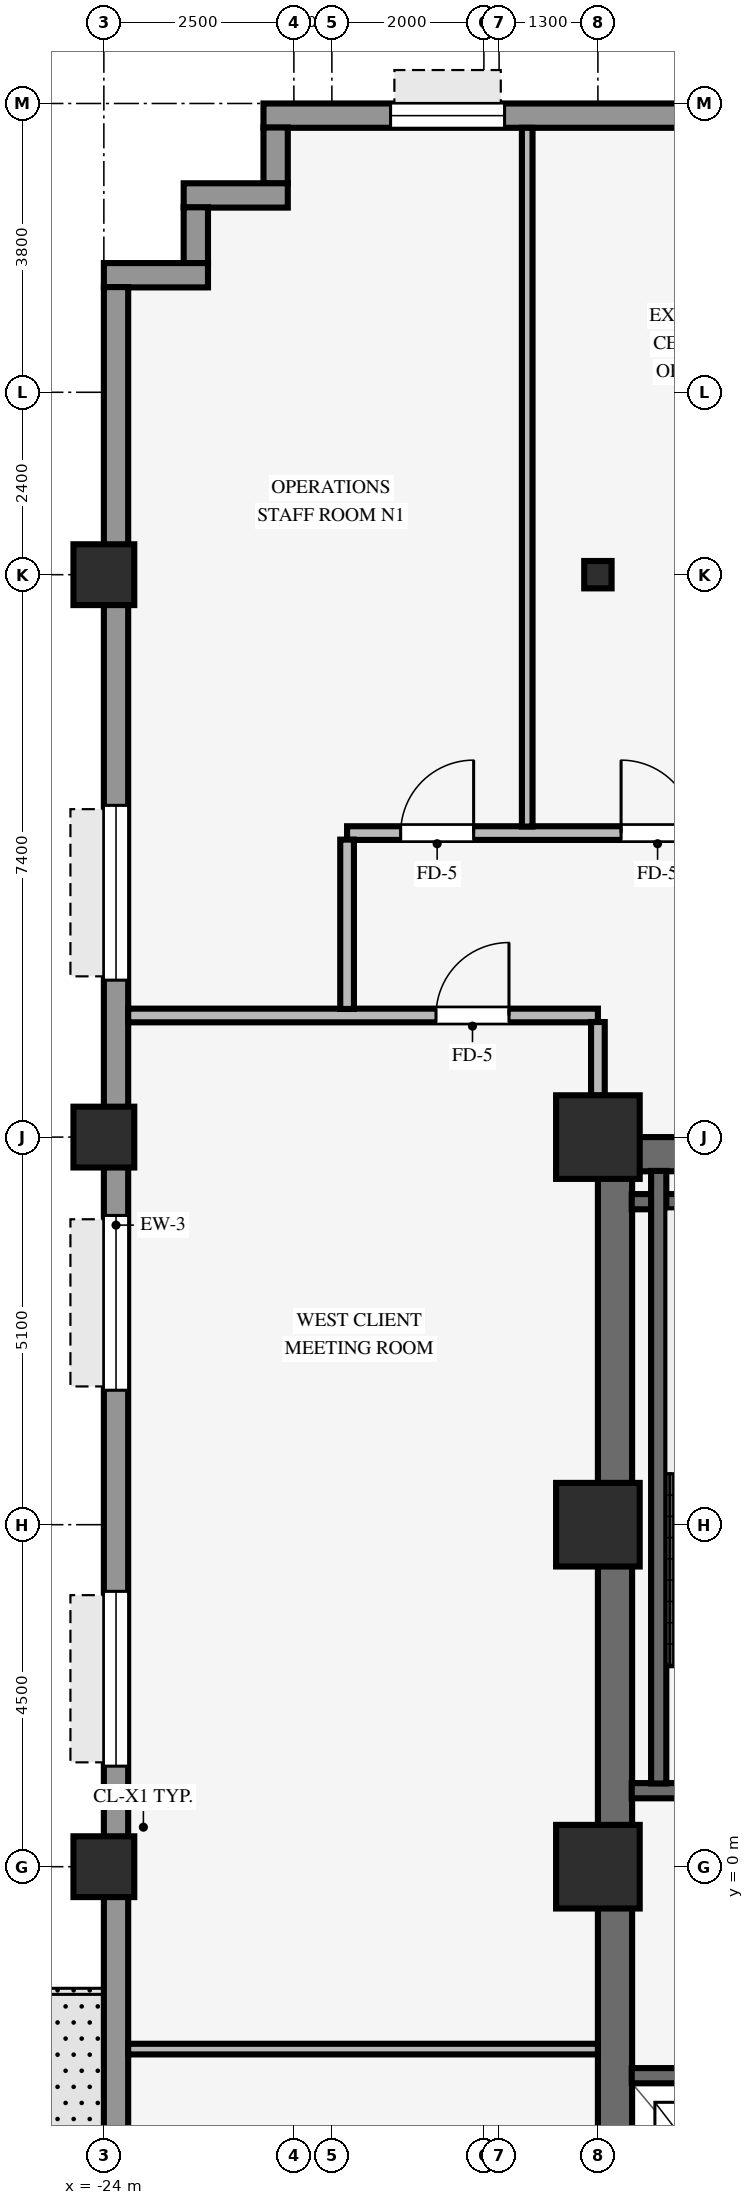
"""IFC4 building model, lengths in metres.
Left out: names, types, materials, properties, quantities, classifications, styles, units other than length and angle.
Written with IfcOpenShell. Run it as: python <this file> out.ifc"""

import sys

from ifc_helpers import new_model, si_unit, direction, frame, frame_2d, origin, origin_2d, place, context, subcontext, project, spatial, rectangle, hollow_rectangle, i_section, extrude, source, transform, mapped, element, fill, save


model = new_model("IFC4")
c1 = context("Model", 3, precision=1e-05, world=origin(), true_north=direction((0.0, 1.0)))
c2 = subcontext(c1, "Body", "Model", "MODEL_VIEW")
j1 = project(units=[si_unit("LENGTHUNIT", "METRE"), si_unit("PLANEANGLEUNIT", "RADIAN")], contexts=[c1])
p1 = place(None, origin())
s1 = spatial("IfcSite", under=j1, at=p1, CompositionType="ELEMENT")
p2 = place(p1, origin())
s2 = spatial("IfcBuilding", under=s1, at=p2, CompositionType="ELEMENT")
p3 = place(p2, frame((0.0, 0.0, 89.65)))
s3 = spatial("IfcBuildingStorey", under=s2, at=p3, CompositionType="ELEMENT", Elevation=89.65)
p4 = place(p3, frame((-17.5, 9.375, 0.0), z_axis=(0.0, 0.0, 1.0), x_axis=(1.0, 0.0, 0.0)))
e1 = element("IfcWall", 1, at=p4, inside=s3, PredefinedType="SHEAR", context=c2, shape_type="SweptSolid", body=[
    extrude(rectangle(XDim=8.5, YDim=0.45, at=frame_2d((4.25, 0.0))), origin(), (0.0, 0.0, 1.0), 3.25),
])
p5 = place(p3, frame((-17.275, -9.155, 0.0), z_axis=(0.0, 0.0, 1.0), x_axis=(0.0, 1.0, 0.0)))
e2 = element("IfcWall", 2, at=p5, inside=s3, PredefinedType="SHEAR", context=c2, shape_type="SweptSolid", body=[
    extrude(rectangle(XDim=18.31, YDim=0.45, at=frame_2d((9.155, 0.0))), origin(), (0.0, 0.0, 1.0), 3.25),
])
for number, where, z_axis, x_axis in (
    (3, (-17.5, 4.5, 0.0), (0.0, 0.0, 1.0), (1.0, 0.0, 0.0)),
    (4, (-17.5, 9.6, 0.0), (0.0, 0.0, 1.0), (1.0, 0.0, 0.0)),
    (5, (-17.5, 0.0, 0.0), (0.0, 0.0, 1.0), (1.0, 0.0, 0.0)),
):
    element("IfcColumn", number, at=place(p3, frame(where, z_axis=z_axis, x_axis=x_axis)), inside=s3, PredefinedType="COLUMN", context=c2, shape_type="SweptSolid", body=[
        extrude(rectangle(XDim=1.1, YDim=1.1, at=origin_2d()), origin(), (0.0, 0.0, 1.0), 3.25),
    ])
for number, where, z_axis, x_axis in (
    (6, (-24.0, 0.0, 0.0), (0.0, 0.0, 1.0), (1.0, 0.0, 0.0)),
    (7, (-24.0, 9.6, 0.0), (0.0, 0.0, 1.0), (1.0, 0.0, 0.0)),
    (8, (-24.0, 17.0, 0.0), (0.0, 0.0, 1.0), (1.0, 0.0, 0.0)),
):
    element("IfcColumn", number, at=place(p3, frame(where, z_axis=z_axis, x_axis=x_axis)), inside=s3, PredefinedType="COLUMN", context=c2, shape_type="SweptSolid", body=[
        extrude(hollow_rectangle(XDim=0.8, YDim=0.8, WallThickness=0.055, InnerFilletRadius=0.055, OuterFilletRadius=0.11, at=origin_2d()), origin(), (0.0, 0.0, 1.0), 3.25),
    ])
p6 = place(p3, frame((-17.5, 17.0, 0.0), z_axis=(0.0, 0.0, 1.0), x_axis=(1.0, 0.0, 0.0)))
e9 = element("IfcColumn", 9, at=p6, inside=s3, PredefinedType="COLUMN", context=c2, shape_type="SweptSolid", body=[
    extrude(i_section(OverallWidth=0.36, OverallDepth=0.36, WebThickness=0.021, FlangeThickness=0.021, FilletRadius=0.018, at=origin_2d()), origin(), (0.0, 0.0, 1.0), 3.25),
])
p7 = place(p3, frame((-21.9, 23.04, 0.0), z_axis=(0.0, 0.0, 1.0), x_axis=(1.0, 0.0, 0.0)))
e10 = element("IfcWall", 10, at=p7, inside=s3, PredefinedType="STANDARD", context=c2, shape_type="SweptSolid", body=[
    extrude(rectangle(XDim=43.8, YDim=0.32, at=frame_2d((21.9, 0.0))), origin(), (0.0, 0.0, 1.0), 2.585),
])
p8 = place(p7, frame((1.672, 0.0, 0.8)))
e11 = element("IfcOpeningElement", 11, at=p8, cuts=e10, PredefinedType="OPENING", context=c2, shape_type="SweptSolid", body=[
    extrude(rectangle(XDim=1.5, YDim=1.6, at=frame_2d((0.75, 0.8))), frame((0.0, 0.17, 0.0), z_axis=(0.0, -1.0, 0.0), x_axis=(1.0, 0.0, 0.0)), (0.0, 0.0, 1.0), 0.34),
])
p9 = place(p7, frame((6.317, 0.0, 0.8)))
e12 = element("IfcOpeningElement", 12, at=p9, cuts=e10, PredefinedType="OPENING", context=c2, shape_type="SweptSolid", body=[
    extrude(rectangle(XDim=1.5, YDim=1.6, at=frame_2d((0.75, 0.8))), frame((0.0, 0.17, 0.0), z_axis=(0.0, -1.0, 0.0), x_axis=(1.0, 0.0, 0.0)), (0.0, 0.0, 1.0), 0.34),
])
p10 = place(p7, frame((17.856, 0.0, 0.8)))
e13 = element("IfcOpeningElement", 13, at=p10, cuts=e10, PredefinedType="OPENING", context=c2, shape_type="SweptSolid", body=[
    extrude(rectangle(XDim=1.5, YDim=1.6, at=frame_2d((0.75, 0.8))), frame((0.0, 0.17, 0.0), z_axis=(0.0, -1.0, 0.0), x_axis=(1.0, 0.0, 0.0)), (0.0, 0.0, 1.0), 0.34),
])
p11 = place(p7, frame((24.894, 0.0, 0.8)))
e14 = element("IfcOpeningElement", 14, at=p11, cuts=e10, PredefinedType="OPENING", context=c2, shape_type="SweptSolid", body=[
    extrude(rectangle(XDim=1.5, YDim=1.6, at=frame_2d((0.75, 0.8))), frame((0.0, 0.17, 0.0), z_axis=(0.0, -1.0, 0.0), x_axis=(1.0, 0.0, 0.0)), (0.0, 0.0, 1.0), 0.34),
])
p12 = place(p7, frame((35.083, 0.0, 0.8)))
e15 = element("IfcOpeningElement", 15, at=p12, cuts=e10, PredefinedType="OPENING", context=c2, shape_type="SweptSolid", body=[
    extrude(rectangle(XDim=1.5, YDim=1.6, at=frame_2d((0.75, 0.8))), frame((0.0, 0.17, 0.0), z_axis=(0.0, -1.0, 0.0), x_axis=(1.0, 0.0, 0.0)), (0.0, 0.0, 1.0), 0.34),
])
p13 = place(p7, frame((39.728, 0.0, 0.8)))
e16 = element("IfcOpeningElement", 16, at=p13, cuts=e10, PredefinedType="OPENING", context=c2, shape_type="SweptSolid", body=[
    extrude(rectangle(XDim=1.5, YDim=1.6, at=frame_2d((0.75, 0.8))), frame((0.0, 0.17, 0.0), z_axis=(0.0, -1.0, 0.0), x_axis=(1.0, 0.0, 0.0)), (0.0, 0.0, 1.0), 0.34),
])
p14 = place(p3, frame((-21.74, 22.146, 0.0), z_axis=(0.0, 0.0, 1.0), x_axis=(0.0, 1.0, 0.0)))
e17 = element("IfcWall", 17, at=p14, inside=s3, PredefinedType="STANDARD", context=c2, shape_type="SweptSolid", body=[
    extrude(rectangle(XDim=0.738, YDim=0.32, at=frame_2d((0.369, 0.0))), origin(), (0.0, 0.0, 1.0), 3.24),
])
p15 = place(p3, frame((-22.95, 21.99, 0.0), z_axis=(0.0, 0.0, 1.0), x_axis=(1.0, 0.0, 0.0)))
e18 = element("IfcWall", 18, at=p15, inside=s3, PredefinedType="STANDARD", context=c2, shape_type="SweptSolid", body=[
    extrude(rectangle(XDim=1.37, YDim=0.32, at=frame_2d((0.685, 0.0))), origin(), (0.0, 0.0, 1.0), 3.24),
])
p16 = place(p3, frame((-22.79, 21.096, 0.0), z_axis=(0.0, 0.0, 1.0), x_axis=(0.0, 1.0, 0.0)))
e19 = element("IfcWall", 19, at=p16, inside=s3, PredefinedType="STANDARD", context=c2, shape_type="SweptSolid", body=[
    extrude(rectangle(XDim=0.738, YDim=0.32, at=frame_2d((0.369, 0.0))), origin(), (0.0, 0.0, 1.0), 3.24),
])
p17 = place(p3, frame((-24.0, 20.94, 0.0), z_axis=(0.0, 0.0, 1.0), x_axis=(1.0, 0.0, 0.0)))
e20 = element("IfcWall", 20, at=p17, inside=s3, PredefinedType="STANDARD", context=c2, shape_type="SweptSolid", body=[
    extrude(rectangle(XDim=1.37, YDim=0.32, at=frame_2d((0.685, 0.0))), origin(), (0.0, 0.0, 1.0), 3.24),
])
p18 = place(p3, frame((-23.84, -20.784, 0.0), z_axis=(0.0, 0.0, 1.0), x_axis=(0.0, 1.0, 0.0)))
e21 = element("IfcWall", 21, at=p18, inside=s3, PredefinedType="STANDARD", context=c2, shape_type="SweptSolid", body=[
    extrude(rectangle(XDim=41.568, YDim=0.32, at=frame_2d((20.784, 0.0))), origin(), (0.0, 0.0, 1.0), 2.585),
])
p19 = place(p18, frame((15.384, 0.0, 0.0)))
e22 = element("IfcOpeningElement", 22, at=p19, cuts=e21, PredefinedType="OPENING", context=c2, shape_type="SweptSolid", body=[
    extrude(rectangle(XDim=1.05, YDim=2.1, at=frame_2d((0.525, 1.05))), frame((0.0, 0.17, 0.0), z_axis=(0.0, -1.0, 0.0), x_axis=(1.0, 0.0, 0.0)), (0.0, 0.0, 1.0), 0.34),
])
p20 = place(p18, frame((6.819, 0.0, 0.8)))
e23 = element("IfcOpeningElement", 23, at=p20, cuts=e21, PredefinedType="OPENING", context=c2, shape_type="SweptSolid", body=[
    extrude(rectangle(XDim=2.3, YDim=1.62, at=frame_2d((1.15, 0.81))), frame((0.0, 0.17, 0.0), z_axis=(0.0, -1.0, 0.0), x_axis=(1.0, 0.0, 0.0)), (0.0, 0.0, 1.0), 0.34),
])
p21 = place(p18, frame((12.215, 0.0, 0.8)))
e24 = element("IfcOpeningElement", 24, at=p21, cuts=e21, PredefinedType="OPENING", context=c2, shape_type="SweptSolid", body=[
    extrude(rectangle(XDim=2.3, YDim=1.62, at=frame_2d((1.15, 0.81))), frame((0.0, 0.17, 0.0), z_axis=(0.0, -1.0, 0.0), x_axis=(1.0, 0.0, 0.0)), (0.0, 0.0, 1.0), 0.34),
])
p22 = place(p18, frame((22.107, 0.0, 0.8)))
e25 = element("IfcOpeningElement", 25, at=p22, cuts=e21, PredefinedType="OPENING", context=c2, shape_type="SweptSolid", body=[
    extrude(rectangle(XDim=2.3, YDim=1.62, at=frame_2d((1.15, 0.81))), frame((0.0, 0.17, 0.0), z_axis=(0.0, -1.0, 0.0), x_axis=(1.0, 0.0, 0.0)), (0.0, 0.0, 1.0), 0.34),
])
p23 = place(p18, frame((27.053, 0.0, 0.8)))
e26 = element("IfcOpeningElement", 26, at=p23, cuts=e21, PredefinedType="OPENING", context=c2, shape_type="SweptSolid", body=[
    extrude(rectangle(XDim=2.3, YDim=1.62, at=frame_2d((1.15, 0.81))), frame((0.0, 0.17, 0.0), z_axis=(0.0, -1.0, 0.0), x_axis=(1.0, 0.0, 0.0)), (0.0, 0.0, 1.0), 0.34),
])
p24 = place(p18, frame((32.449, 0.0, 0.8)))
e27 = element("IfcOpeningElement", 27, at=p24, cuts=e21, PredefinedType="OPENING", context=c2, shape_type="SweptSolid", body=[
    extrude(rectangle(XDim=2.3, YDim=1.62, at=frame_2d((1.15, 0.81))), frame((0.0, 0.17, 0.0), z_axis=(0.0, -1.0, 0.0), x_axis=(1.0, 0.0, 0.0)), (0.0, 0.0, 1.0), 0.34),
])
for number, where, z_axis, x_axis in (
    (28, (-17.055, 1.0, 0.0), (0.0, 0.0, 1.0), (1.0, 0.0, 0.0)),
    (29, (-17.055, 8.75, 0.0), (0.0, 0.0, 1.0), (1.0, 0.0, 0.0)),
):
    element("IfcWall", number, at=place(p3, frame(where, z_axis=z_axis, x_axis=x_axis)), inside=s3, PredefinedType="SHEAR", context=c2, shape_type="SweptSolid", body=[
        extrude(rectangle(XDim=3.52, YDim=0.2, at=frame_2d((1.76, 0.0))), origin(), (0.0, 0.0, 1.0), 3.25),
    ])
p25 = place(p3, frame((-16.7, 1.095, 0.0), z_axis=(0.0, 0.0, 1.0), x_axis=(0.0, 1.0, 0.0)))
e30 = element("IfcWall", 30, at=p25, inside=s3, PredefinedType="SHEAR", context=c2, shape_type="SweptSolid", body=[
    extrude(rectangle(XDim=8.06, YDim=0.2, at=frame_2d((4.03, 0.0))), origin(), (0.0, 0.0, 1.0), 3.25),
])
p26 = place(p3, frame((-17.055, -2.75, 0.0), z_axis=(0.0, 0.0, 1.0), x_axis=(1.0, 0.0, 0.0)))
e31 = element("IfcWall", 31, at=p26, inside=s3, PredefinedType="SHEAR", context=c2, shape_type="SweptSolid", body=[
    extrude(rectangle(XDim=2.61, YDim=0.2, at=frame_2d((1.305, 0.0))), origin(), (0.0, 0.0, 1.0), 3.25),
])
p27 = place(p3, frame((-23.68, -2.4, 0.0), z_axis=(0.0, 0.0, 1.0), x_axis=(1.0, 0.0, 0.0)))
e32 = element("IfcWall", 32, at=p27, inside=s3, PredefinedType="PARTITIONING", context=c2, shape_type="SweptSolid", body=[
    extrude(rectangle(XDim=6.18, YDim=0.14, at=frame_2d((3.09, 0.0))), origin(), (0.0, 0.0, 1.0), 3.24),
])
p28 = place(p3, frame((-23.68, 11.2, 0.0), z_axis=(0.0, 0.0, 1.0), x_axis=(1.0, 0.0, 0.0)))
e33 = element("IfcWall", 33, at=p28, inside=s3, PredefinedType="PARTITIONING", context=c2, shape_type="SweptSolid", body=[
    extrude(rectangle(XDim=6.18, YDim=0.18, at=frame_2d((3.09, 0.0))), origin(), (0.0, 0.0, 1.0), 3.24),
])
p29 = place(p28, frame((4.05, 0.0, 0.0)))
e34 = element("IfcOpeningElement", 34, at=p29, cuts=e33, PredefinedType="OPENING", context=c2, shape_type="SweptSolid", body=[
    extrude(rectangle(XDim=0.96, YDim=2.1, at=frame_2d((0.48, 1.05))), frame((0.0, 0.1, 0.0), z_axis=(0.0, -1.0, 0.0), x_axis=(1.0, 0.0, 0.0)), (0.0, 0.0, 1.0), 0.2),
])
p30 = place(p3, frame((-20.8, 13.6, 0.0), z_axis=(0.0, 0.0, 1.0), x_axis=(1.0, 0.0, 0.0)))
e35 = element("IfcWall", 35, at=p30, inside=s3, PredefinedType="PARTITIONING", context=c2, shape_type="SweptSolid", body=[
    extrude(rectangle(XDim=5.8, YDim=0.18, at=frame_2d((2.9, 0.0))), origin(), (0.0, 0.0, 1.0), 2.878),
])
p31 = place(p30, frame((3.605, 0.0, 0.0)))
e36 = element("IfcOpeningElement", 36, at=p31, cuts=e35, PredefinedType="OPENING", context=c2, shape_type="SweptSolid", body=[
    extrude(rectangle(XDim=0.96, YDim=2.1, at=frame_2d((0.48, 1.05))), frame((0.0, 0.1, 0.0), z_axis=(0.0, -1.0, 0.0), x_axis=(1.0, 0.0, 0.0)), (0.0, 0.0, 1.0), 0.2),
])
p32 = place(p30, frame((0.705, 0.0, 0.0)))
e37 = element("IfcOpeningElement", 37, at=p32, cuts=e35, PredefinedType="OPENING", context=c2, shape_type="SweptSolid", body=[
    extrude(rectangle(XDim=0.96, YDim=2.1, at=frame_2d((0.48, 1.05))), frame((0.0, 0.1, 0.0), z_axis=(0.0, -1.0, 0.0), x_axis=(1.0, 0.0, 0.0)), (0.0, 0.0, 1.0), 0.2),
])
p33 = place(p3, frame((-20.8, 11.286, 0.0), z_axis=(0.0, 0.0, 1.0), x_axis=(0.0, 1.0, 0.0)))
e38 = element("IfcWall", 38, at=p33, inside=s3, PredefinedType="PARTITIONING", context=c2, shape_type="SweptSolid", body=[
    extrude(rectangle(XDim=2.228, YDim=0.18, at=frame_2d((1.114, 0.0))), origin(), (0.0, 0.0, 1.0), 3.24),
])
p34 = place(p3, frame((-18.43, 13.686, 0.0), z_axis=(0.0, 0.0, 1.0), x_axis=(0.0, 1.0, 0.0)))
e39 = element("IfcWall", 39, at=p34, inside=s3, PredefinedType="PARTITIONING", context=c2, shape_type="SweptSolid", body=[
    extrude(rectangle(XDim=9.194, YDim=0.14, at=frame_2d((4.597, 0.0))), origin(), (0.0, 0.0, 1.0), 3.24),
])
p35 = place(p3, frame((-17.5, 10.146, 0.0), z_axis=(0.0, 0.0, 1.0), x_axis=(0.0, 1.0, 0.0)))
e40 = element("IfcWall", 40, at=p35, inside=s3, PredefinedType="PARTITIONING", context=c2, shape_type="SweptSolid", body=[
    extrude(rectangle(XDim=0.968, YDim=0.18, at=frame_2d((0.484, 0.0))), origin(), (0.0, 0.0, 1.0), 2.335),
])
m1 = source(origin(), c2, "Body", "SweptSolid", [
    extrude(rectangle(XDim=1.5, YDim=1.6, at=frame_2d((0.75, 0.8))), frame((0.0, 0.03, 0.0), z_axis=(0.0, -1.0, 0.0), x_axis=(1.0, 0.0, 0.0)), (0.0, 0.0, 1.0), 0.06),
])
p36 = place(p8, origin())
e41 = element("IfcWindow", 41, at=p36, inside=s3, PartitioningType="SINGLE_PANEL", PredefinedType="WINDOW", context=c2, shape_type="MappedRepresentation", body=[
    mapped(m1, transform((0.0, 0.0, 0.0), scale=1.0)),
])
fill(e11, e41)
m2 = source(origin(), c2, "Body", "SweptSolid", [
    extrude(rectangle(XDim=2.3, YDim=1.62, at=frame_2d((1.15, 0.81))), frame((0.0, 0.03, 0.0), z_axis=(0.0, -1.0, 0.0), x_axis=(1.0, 0.0, 0.0)), (0.0, 0.0, 1.0), 0.06),
])
p37 = place(p22, origin())
e42 = element("IfcWindow", 42, at=p37, inside=s3, PartitioningType="SINGLE_PANEL", PredefinedType="WINDOW", context=c2, shape_type="MappedRepresentation", body=[
    mapped(m2, transform((0.0, 0.0, 0.0), scale=1.0)),
])
fill(e25, e42)
p38 = place(p23, origin())
e43 = element("IfcWindow", 43, at=p38, inside=s3, PartitioningType="SINGLE_PANEL", PredefinedType="WINDOW", context=c2, shape_type="MappedRepresentation", body=[
    mapped(m2, transform((0.0, 0.0, 0.0), scale=1.0)),
])
fill(e26, e43)
p39 = place(p24, origin())
e44 = element("IfcWindow", 44, at=p39, inside=s3, PartitioningType="SINGLE_PANEL", PredefinedType="WINDOW", context=c2, shape_type="MappedRepresentation", body=[
    mapped(m2, transform((0.0, 0.0, 0.0), scale=1.0)),
])
fill(e27, e44)
m3 = source(origin(), c2, "Body", "SweptSolid", [
    extrude(rectangle(XDim=0.96, YDim=2.1, at=frame_2d((0.48, 1.05))), frame((0.0, 0.025, 0.0), z_axis=(0.0, -1.0, 0.0), x_axis=(1.0, 0.0, 0.0)), (0.0, 0.0, 1.0), 0.05),
])
p40 = place(p31, origin())
e45 = element("IfcDoor", 45, at=p40, inside=s3, OperationType="SINGLE_SWING_LEFT", PredefinedType="DOOR", context=c2, shape_type="MappedRepresentation", body=[
    mapped(m3, transform((0.0, 0.0, 0.0), scale=1.0)),
])
fill(e36, e45)
p41 = place(p29, origin())
e46 = element("IfcDoor", 46, at=p41, inside=s3, OperationType="SINGLE_SWING_RIGHT", PredefinedType="DOOR", context=c2, shape_type="MappedRepresentation", body=[
    mapped(m3, transform((0.0, 0.0, 0.0), scale=1.0)),
])
fill(e34, e46)
p42 = place(p32, origin())
e47 = element("IfcDoor", 47, at=p42, inside=s3, OperationType="SINGLE_SWING_RIGHT", PredefinedType="DOOR", context=c2, shape_type="MappedRepresentation", body=[
    mapped(m3, transform((0.0, 0.0, 0.0), scale=1.0)),
])
fill(e37, e47)
save(model, sys.argv[1])
